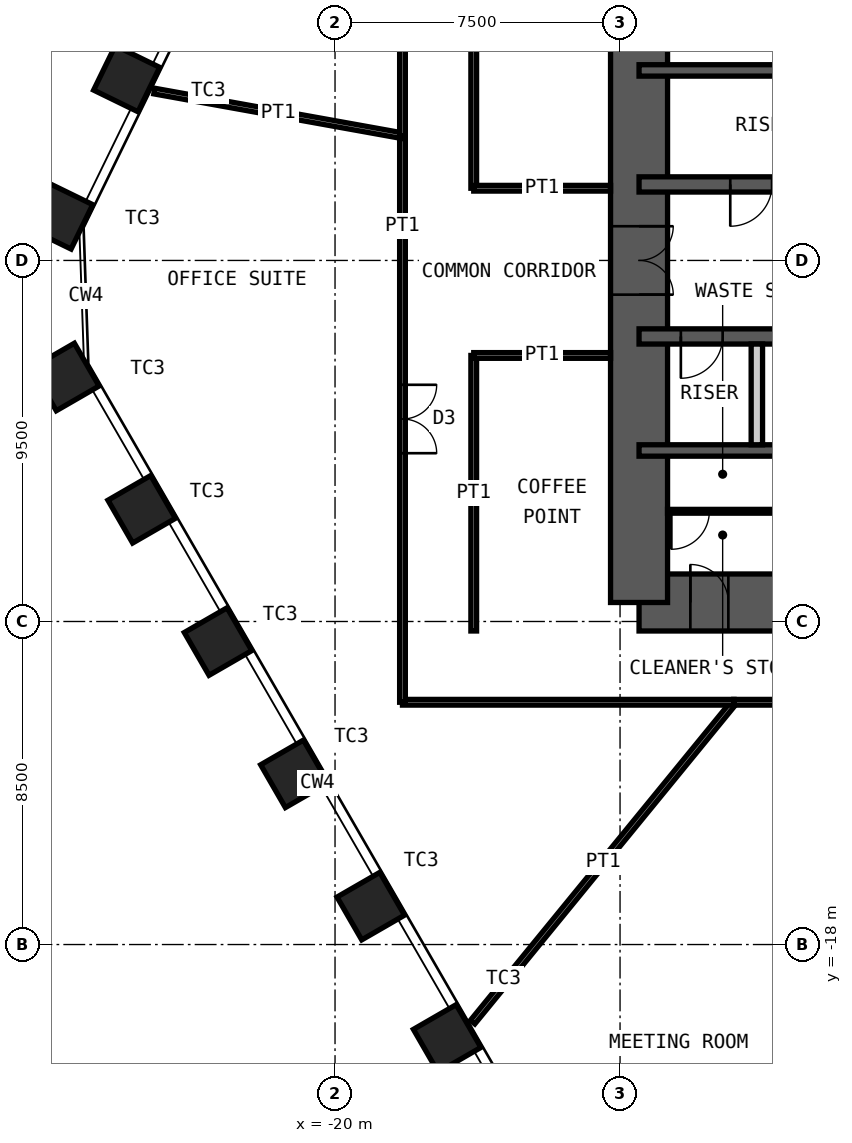
"""IFC4 building model, lengths in metres.
Left out: names, types, materials, properties, quantities, classifications, styles, units other than length and angle.
Written with IfcOpenShell. Run it as: python <this file> out.ifc"""

import sys

from ifc_helpers import new_model, si_unit, direction, frame, frame_2d, origin, origin_2d, place, context, subcontext, project, spatial, rectangle, hollow_rectangle, extrude, element, fill, save


model = new_model("IFC4")
c1 = context("Model", 3, precision=1e-05, world=origin(), true_north=direction((0.0, 1.0)))
c2 = subcontext(c1, "Body", "Model", "MODEL_VIEW")
j1 = project(units=[si_unit("LENGTHUNIT", "METRE"), si_unit("PLANEANGLEUNIT", "RADIAN")], contexts=[c1])
p1 = place(None, origin())
s1 = spatial("IfcSite", under=j1, at=p1, CompositionType="ELEMENT")
p2 = place(p1, origin())
s2 = spatial("IfcBuilding", under=s1, at=p2, CompositionType="ELEMENT")
p3 = place(p2, frame((0.0, 0.0, 107.2)))
s3 = spatial("IfcBuildingStorey", under=s2, at=p3, CompositionType="ELEMENT", Elevation=107.2)
for number, where, z_axis, x_axis in (
    (1, (-17.049, -20.47, 0.0), (0.0, 0.0, 1.0), (0.5, -0.866, 0.0)),
    (2, (-19.059, -16.989, 0.0), (0.0, 0.0, 1.0), (0.5, -0.866, 0.0)),
    (3, (-21.068, -13.509, 0.0), (0.0, 0.0, 1.0), (0.5, -0.866, 0.0)),
    (4, (-23.078, -10.028, 0.0), (0.0, 0.0, 1.0), (0.5, -0.866, 0.0)),
    (5, (-25.087, -6.547, 0.0), (0.0, 0.0, 1.0), (0.5, -0.866, 0.0)),
    (6, (-27.097, -3.067, 0.0), (0.0, 0.0, 1.0), (0.5, -0.866, 0.0)),
    (7, (-27.245, 1.169, 0.0), (0.0, 0.0, 1.0), (-0.438, -0.899, 0.0)),
    (8, (-25.483, 4.781, 0.0), (0.0, 0.0, 1.0), (-0.438, -0.899, 0.0)),
):
    element("IfcColumn", number, at=place(p3, frame(where, z_axis=z_axis, x_axis=x_axis)), inside=s3, PredefinedType="COLUMN", context=c2, shape_type="SweptSolid", body=[
        extrude(hollow_rectangle(XDim=1.3, YDim=1.3, WallThickness=0.1, at=origin_2d()), origin(), (0.0, 0.0, 1.0), 4.2),
    ])
p4 = place(p3, frame((-12.0, -9.0, 0.0), z_axis=(0.0, 0.0, 1.0), x_axis=(1.0, 0.0, 0.0)))
e9 = element("IfcWall", 9, at=p4, inside=s3, PredefinedType="SHEAR", context=c2, shape_type="SweptSolid", body=[
    extrude(rectangle(XDim=24.0, YDim=1.5, at=frame_2d((12.0, 0.0))), origin(), (0.0, 0.0, 1.0), 4.2),
])
p5 = place(p4, frame((1.35, 0.0, 0.0)))
e10 = element("IfcOpeningElement", 10, at=p5, cuts=e9, PredefinedType="OPENING", context=c2, shape_type="SweptSolid", body=[
    extrude(rectangle(XDim=1.0, YDim=2.1, at=frame_2d((0.5, 1.05))), frame((0.0, 0.76, 0.0), z_axis=(0.0, -1.0, 0.0), x_axis=(1.0, 0.0, 0.0)), (0.0, 0.0, 1.0), 1.52),
])
p6 = place(p4, frame((5.325, 0.0, 0.0)))
e11 = element("IfcOpeningElement", 11, at=p6, cuts=e9, PredefinedType="OPENING", context=c2, shape_type="SweptSolid", body=[
    extrude(rectangle(XDim=1.15, YDim=2.1, at=frame_2d((0.575, 1.05))), frame((0.0, 0.76, 0.0), z_axis=(0.0, -1.0, 0.0), x_axis=(1.0, 0.0, 0.0)), (0.0, 0.0, 1.0), 1.52),
])
p7 = place(p4, frame((12.6, 0.0, 0.0)))
e12 = element("IfcOpeningElement", 12, at=p7, cuts=e9, PredefinedType="OPENING", context=c2, shape_type="SweptSolid", body=[
    extrude(rectangle(XDim=1.0, YDim=2.1, at=frame_2d((0.5, 1.05))), frame((0.0, 0.76, 0.0), z_axis=(0.0, -1.0, 0.0), x_axis=(1.0, 0.0, 0.0)), (0.0, 0.0, 1.0), 1.52),
])
p8 = place(p3, frame((-12.0, -9.0, 0.0), z_axis=(0.0, 0.0, 1.0), x_axis=(0.0, 1.0, 0.0)))
e13 = element("IfcWall", 13, at=p8, inside=s3, PredefinedType="SHEAR", context=c2, shape_type="SweptSolid", body=[
    extrude(rectangle(XDim=18.0, YDim=1.5, at=frame_2d((9.0, 0.0))), origin(), (0.0, 0.0, 1.0), 4.2),
])
p9 = place(p8, frame((8.1, 0.0, 0.0)))
e14 = element("IfcOpeningElement", 14, at=p9, cuts=e13, PredefinedType="OPENING", context=c2, shape_type="SweptSolid", body=[
    extrude(rectangle(XDim=1.8, YDim=2.1, at=frame_2d((0.9, 1.05))), frame((0.0, 0.76, 0.0), z_axis=(0.0, -1.0, 0.0), x_axis=(1.0, 0.0, 0.0)), (0.0, 0.0, 1.0), 1.52),
])
p10 = place(p3, frame((-12.0, 5.0, 0.0), z_axis=(0.0, 0.0, 1.0), x_axis=(1.0, 0.0, 0.0)))
e15 = element("IfcWall", 15, at=p10, inside=s3, PredefinedType="SHEAR", context=c2, shape_type="SweptSolid", body=[
    extrude(rectangle(XDim=24.0, YDim=0.3, at=frame_2d((12.0, 0.0))), origin(), (0.0, 0.0, 1.0), 4.2),
])
p11 = place(p3, frame((-12.0, 2.0, 0.0), z_axis=(0.0, 0.0, 1.0), x_axis=(1.0, 0.0, 0.0)))
e16 = element("IfcWall", 16, at=p11, inside=s3, PredefinedType="SHEAR", context=c2, shape_type="SweptSolid", body=[
    extrude(rectangle(XDim=24.0, YDim=0.4, at=frame_2d((12.0, 0.0))), origin(), (0.0, 0.0, 1.0), 4.2),
])
p12 = place(p11, frame((2.4, 0.0, 0.0)))
e17 = element("IfcOpeningElement", 17, at=p12, cuts=e16, PredefinedType="OPENING", context=c2, shape_type="SweptSolid", body=[
    extrude(rectangle(XDim=1.1, YDim=2.1, at=frame_2d((0.55, 1.05))), frame((0.0, 0.21, 0.0), z_axis=(0.0, -1.0, 0.0), x_axis=(1.0, 0.0, 0.0)), (0.0, 0.0, 1.0), 0.42),
])
p13 = place(p11, frame((22.0, 0.0, 0.0)))
e18 = element("IfcOpeningElement", 18, at=p13, cuts=e16, PredefinedType="OPENING", context=c2, shape_type="SweptSolid", body=[
    extrude(rectangle(XDim=1.1, YDim=2.1, at=frame_2d((0.55, 1.05))), frame((0.0, 0.21, 0.0), z_axis=(0.0, -1.0, 0.0), x_axis=(1.0, 0.0, 0.0)), (0.0, 0.0, 1.0), 0.42),
])
p14 = place(p11, frame((10.15, 0.0, 0.0)))
e19 = element("IfcOpeningElement", 19, at=p14, cuts=e16, PredefinedType="OPENING", context=c2, shape_type="SweptSolid", body=[
    extrude(rectangle(XDim=1.0, YDim=2.1, at=frame_2d((0.5, 1.05))), frame((0.0, 0.21, 0.0), z_axis=(0.0, -1.0, 0.0), x_axis=(1.0, 0.0, 0.0)), (0.0, 0.0, 1.0), 0.42),
])
p15 = place(p11, frame((6.9, 0.0, 0.0)))
e20 = element("IfcOpeningElement", 20, at=p15, cuts=e16, PredefinedType="OPENING", context=c2, shape_type="SweptSolid", body=[
    extrude(rectangle(XDim=1.0, YDim=2.1, at=frame_2d((0.5, 1.05))), frame((0.0, 0.21, 0.0), z_axis=(0.0, -1.0, 0.0), x_axis=(1.0, 0.0, 0.0)), (0.0, 0.0, 1.0), 0.42),
])
p16 = place(p11, frame((13.35, 0.0, 0.0)))
e21 = element("IfcOpeningElement", 21, at=p16, cuts=e16, PredefinedType="OPENING", context=c2, shape_type="SweptSolid", body=[
    extrude(rectangle(XDim=1.1, YDim=2.4, at=frame_2d((0.55, 1.2))), frame((0.0, 0.21, 0.0), z_axis=(0.0, -1.0, 0.0), x_axis=(1.0, 0.0, 0.0)), (0.0, 0.0, 1.0), 0.42),
])
p17 = place(p11, frame((16.15, 0.0, 0.0)))
e22 = element("IfcOpeningElement", 22, at=p17, cuts=e16, PredefinedType="OPENING", context=c2, shape_type="SweptSolid", body=[
    extrude(rectangle(XDim=1.1, YDim=2.4, at=frame_2d((0.55, 1.2))), frame((0.0, 0.21, 0.0), z_axis=(0.0, -1.0, 0.0), x_axis=(1.0, 0.0, 0.0)), (0.0, 0.0, 1.0), 0.42),
])
p18 = place(p11, frame((18.95, 0.0, 0.0)))
e23 = element("IfcOpeningElement", 23, at=p18, cuts=e16, PredefinedType="OPENING", context=c2, shape_type="SweptSolid", body=[
    extrude(rectangle(XDim=1.1, YDim=2.4, at=frame_2d((0.55, 1.2))), frame((0.0, 0.21, 0.0), z_axis=(0.0, -1.0, 0.0), x_axis=(1.0, 0.0, 0.0)), (0.0, 0.0, 1.0), 0.42),
])
p19 = place(p3, frame((-12.0, -2.0, 0.0), z_axis=(0.0, 0.0, 1.0), x_axis=(1.0, 0.0, 0.0)))
e24 = element("IfcWall", 24, at=p19, inside=s3, PredefinedType="SHEAR", context=c2, shape_type="SweptSolid", body=[
    extrude(rectangle(XDim=24.0, YDim=0.4, at=frame_2d((12.0, 0.0))), origin(), (0.0, 0.0, 1.0), 4.2),
])
p20 = place(p19, frame((1.1, 0.0, 0.0)))
e25 = element("IfcOpeningElement", 25, at=p20, cuts=e24, PredefinedType="OPENING", context=c2, shape_type="SweptSolid", body=[
    extrude(rectangle(XDim=1.1, YDim=2.1, at=frame_2d((0.55, 1.05))), frame((0.0, 0.21, 0.0), z_axis=(0.0, -1.0, 0.0), x_axis=(1.0, 0.0, 0.0)), (0.0, 0.0, 1.0), 0.42),
])
p21 = place(p19, frame((13.55, 0.0, 0.0)))
e26 = element("IfcOpeningElement", 26, at=p21, cuts=e24, PredefinedType="OPENING", context=c2, shape_type="SweptSolid", body=[
    extrude(rectangle(XDim=1.1, YDim=2.1, at=frame_2d((0.55, 1.05))), frame((0.0, 0.21, 0.0), z_axis=(0.0, -1.0, 0.0), x_axis=(1.0, 0.0, 0.0)), (0.0, 0.0, 1.0), 0.42),
])
p22 = place(p19, frame((20.7, 0.0, 0.0)))
e27 = element("IfcOpeningElement", 27, at=p22, cuts=e24, PredefinedType="OPENING", context=c2, shape_type="SweptSolid", body=[
    extrude(rectangle(XDim=1.1, YDim=2.1, at=frame_2d((0.55, 1.05))), frame((0.0, 0.21, 0.0), z_axis=(0.0, -1.0, 0.0), x_axis=(1.0, 0.0, 0.0)), (0.0, 0.0, 1.0), 0.42),
])
p23 = place(p3, frame((-12.0, -5.0, 0.0), z_axis=(0.0, 0.0, 1.0), x_axis=(1.0, 0.0, 0.0)))
e28 = element("IfcWall", 28, at=p23, inside=s3, PredefinedType="SHEAR", context=c2, shape_type="SweptSolid", body=[
    extrude(rectangle(XDim=24.0, YDim=0.3, at=frame_2d((12.0, 0.0))), origin(), (0.0, 0.0, 1.0), 4.2),
])
p24 = place(p3, frame((-8.9, -4.85, 0.0), z_axis=(0.0, 0.0, 1.0), x_axis=(0.0, 1.0, 0.0)))
e29 = element("IfcWall", 29, at=p24, inside=s3, PredefinedType="PARTITIONING", context=c2, shape_type="SweptSolid", body=[
    extrude(rectangle(XDim=2.65, YDim=0.3, at=frame_2d((1.325, 0.0))), origin(), (0.0, 0.0, 1.0), 3.98),
])
p25 = place(p3, frame((-11.25, -6.6, 0.0), z_axis=(0.0, 0.0, 1.0), x_axis=(1.0, 0.0, 0.0)))
e30 = element("IfcWall", 30, at=p25, inside=s3, PredefinedType="PARTITIONING", context=c2, shape_type="SweptSolid", body=[
    extrude(rectangle(XDim=2.9, YDim=0.1, at=frame_2d((1.45, 0.0))), origin(), (0.0, 0.0, 1.0), 3.98),
])
p26 = place(p25, frame((0.1, 0.0, 0.0)))
e31 = element("IfcOpeningElement", 31, at=p26, cuts=e30, PredefinedType="OPENING", context=c2, shape_type="SweptSolid", body=[
    extrude(rectangle(XDim=1.0, YDim=2.4, at=frame_2d((0.5, 1.2))), frame((0.0, 0.06, 0.0), z_axis=(0.0, -1.0, 0.0), x_axis=(1.0, 0.0, 0.0)), (0.0, 0.0, 1.0), 0.12),
])
p27 = place(p3, frame((-16.38, -20.042, 0.0), z_axis=(0.0, 0.0, 1.0), x_axis=(0.632814540967, 0.774303400962, 0.0)))
e32 = element("IfcWall", 32, at=p27, inside=s3, PredefinedType="PARTITIONING", context=c2, shape_type="SweptSolid", body=[
    extrude(rectangle(XDim=10.871, YDim=0.15, at=frame_2d((5.435, 0.0))), origin(), (0.0, 0.0, 1.0), 3.33),
])
p28 = place(p3, frame((-9.501, -11.625, 0.0), z_axis=(0.0, 0.0, 1.0), x_axis=(-1.0, 0.0, 0.0)))
e33 = element("IfcWall", 33, at=p28, inside=s3, PredefinedType="PARTITIONING", context=c2, shape_type="SweptSolid", body=[
    extrude(rectangle(XDim=8.724, YDim=0.15, at=frame_2d((4.362, 0.0))), origin(), (0.0, 0.0, 1.0), 4.03),
])
p29 = place(p3, frame((-18.225, -11.625, 0.0), z_axis=(0.0, 0.0, 1.0), x_axis=(0.0, 1.0, 0.0)))
e34 = element("IfcWall", 34, at=p29, inside=s3, PredefinedType="PARTITIONING", context=c2, shape_type="SweptSolid", body=[
    extrude(rectangle(XDim=14.906, YDim=0.15, at=frame_2d((7.453, 0.0))), origin(), (0.0, 0.0, 1.0), 4.03),
])
p30 = place(p29, frame((6.553, 0.0, 0.0)))
e35 = element("IfcOpeningElement", 35, at=p30, cuts=e34, PredefinedType="OPENING", context=c2, shape_type="SweptSolid", body=[
    extrude(rectangle(XDim=1.8, YDim=2.4, at=frame_2d((0.9, 1.2))), frame((0.0, 0.085, 0.0), z_axis=(0.0, -1.0, 0.0), x_axis=(1.0, 0.0, 0.0)), (0.0, 0.0, 1.0), 0.17),
])
p31 = place(p3, frame((-24.755, 4.457, 0.0), z_axis=(0.0, 0.0, 1.0), x_axis=(0.984174598206, -0.177201467959, 0.0)))
e36 = element("IfcWall", 36, at=p31, inside=s3, PredefinedType="PARTITIONING", context=c2, shape_type="SweptSolid", body=[
    extrude(rectangle(XDim=6.635, YDim=0.15, at=frame_2d((3.318, 0.0))), origin(), (0.0, 0.0, 1.0), 3.33),
])
p32 = place(p3, frame((-18.225, 3.281, 0.0), z_axis=(0.0, 0.0, 1.0), x_axis=(0.0, 1.0, 0.0)))
e37 = element("IfcWall", 37, at=p32, inside=s3, PredefinedType="PARTITIONING", context=c2, shape_type="SweptSolid", body=[
    extrude(rectangle(XDim=8.344, YDim=0.15, at=frame_2d((4.172, 0.0))), origin(), (0.0, 0.0, 1.0), 4.03),
])
p33 = place(p3, frame((-3.497, -11.625, 0.0), z_axis=(0.0, 0.0, 1.0), x_axis=(-1.0, 0.0, 0.0)))
e38 = element("IfcWall", 38, at=p33, inside=s3, PredefinedType="PARTITIONING", context=c2, shape_type="SweptSolid", body=[
    extrude(rectangle(XDim=6.004, YDim=0.15, at=frame_2d((3.002, 0.0))), origin(), (0.0, 0.0, 1.0), 4.03),
])
p34 = place(p33, frame((2.502, 0.0, 0.0)))
e39 = element("IfcOpeningElement", 39, at=p34, cuts=e38, PredefinedType="OPENING", context=c2, shape_type="SweptSolid", body=[
    extrude(rectangle(XDim=1.0, YDim=2.4, at=frame_2d((0.5, 1.2))), frame((0.0, 0.085, 0.0), z_axis=(0.0, -1.0, 0.0), x_axis=(1.0, 0.0, 0.0)), (0.0, 0.0, 1.0), 0.17),
])
p35 = place(p3, frame((-16.35, 1.9, 0.0), z_axis=(0.0, 0.0, 1.0), x_axis=(0.0, 1.0, 0.0)))
e40 = element("IfcWall", 40, at=p35, inside=s3, PredefinedType="PARTITIONING", context=c2, shape_type="SweptSolid", body=[
    extrude(rectangle(XDim=7.85, YDim=0.15, at=frame_2d((3.925, 0.0))), origin(), (0.0, 0.0, 1.0), 4.03),
])
p36 = place(p3, frame((-12.75, 1.9, 0.0), z_axis=(0.0, 0.0, 1.0), x_axis=(-1.0, 0.0, 0.0)))
e41 = element("IfcWall", 41, at=p36, inside=s3, PredefinedType="PARTITIONING", context=c2, shape_type="SweptSolid", body=[
    extrude(rectangle(XDim=3.6, YDim=0.15, at=frame_2d((1.8, 0.0))), origin(), (0.0, 0.0, 1.0), 3.33),
])
p37 = place(p3, frame((-16.35, -9.75, 0.0), z_axis=(0.0, 0.0, 1.0), x_axis=(0.0, 1.0, 0.0)))
e42 = element("IfcWall", 42, at=p37, inside=s3, PredefinedType="PARTITIONING", context=c2, shape_type="SweptSolid", body=[
    extrude(rectangle(XDim=7.25, YDim=0.15, at=frame_2d((3.625, 0.0))), origin(), (0.0, 0.0, 1.0), 4.03),
])
p38 = place(p3, frame((-12.75, -2.5, 0.0), z_axis=(0.0, 0.0, 1.0), x_axis=(-1.0, 0.0, 0.0)))
e43 = element("IfcWall", 43, at=p38, inside=s3, PredefinedType="PARTITIONING", context=c2, shape_type="SweptSolid", body=[
    extrude(rectangle(XDim=3.6, YDim=0.15, at=frame_2d((1.8, 0.0))), origin(), (0.0, 0.0, 1.0), 3.33),
])
p39 = place(p5, origin())
e44 = element("IfcDoor", 44, at=p39, inside=s3, OperationType="SINGLE_SWING_RIGHT", PredefinedType="DOOR", context=c2, shape_type="SweptSolid", body=[
    extrude(rectangle(XDim=1.0, YDim=2.1, at=frame_2d((0.5, 1.05))), frame((0.0, 0.025, 0.0), z_axis=(0.0, -1.0, 0.0), x_axis=(1.0, 0.0, 0.0)), (0.0, 0.0, 1.0), 0.05),
])
fill(e10, e44)
p40 = place(p12, origin())
e45 = element("IfcDoor", 45, at=p40, inside=s3, OperationType="SINGLE_SWING_LEFT", PredefinedType="DOOR", context=c2, shape_type="SweptSolid", body=[
    extrude(rectangle(XDim=1.1, YDim=2.1, at=frame_2d((0.55, 1.05))), frame((0.0, 0.025, 0.0), z_axis=(0.0, -1.0, 0.0), x_axis=(1.0, 0.0, 0.0)), (0.0, 0.0, 1.0), 0.05),
])
fill(e17, e45)
p41 = place(p20, origin())
e46 = element("IfcDoor", 46, at=p41, inside=s3, OperationType="SINGLE_SWING_LEFT", PredefinedType="DOOR", context=c2, shape_type="SweptSolid", body=[
    extrude(rectangle(XDim=1.1, YDim=2.1, at=frame_2d((0.55, 1.05))), frame((0.0, 0.025, 0.0), z_axis=(0.0, -1.0, 0.0), x_axis=(1.0, 0.0, 0.0)), (0.0, 0.0, 1.0), 0.05),
])
fill(e25, e46)
p42 = place(p9, origin())
e47 = element("IfcDoor", 47, at=p42, inside=s3, OperationType="DOUBLE_DOOR_DOUBLE_SWING", PredefinedType="DOOR", context=c2, shape_type="SweptSolid", body=[
    extrude(rectangle(XDim=1.8, YDim=2.1, at=frame_2d((0.9, 1.05))), frame((0.0, 0.025, 0.0), z_axis=(0.0, -1.0, 0.0), x_axis=(1.0, 0.0, 0.0)), (0.0, 0.0, 1.0), 0.05),
])
fill(e14, e47)
p43 = place(p26, origin())
e48 = element("IfcDoor", 48, at=p43, inside=s3, OperationType="SINGLE_SWING_LEFT", PredefinedType="DOOR", context=c2, shape_type="SweptSolid", body=[
    extrude(rectangle(XDim=1.0, YDim=2.4, at=frame_2d((0.5, 1.2))), frame((0.0, 0.025, 0.0), z_axis=(0.0, -1.0, 0.0), x_axis=(1.0, 0.0, 0.0)), (0.0, 0.0, 1.0), 0.05),
])
fill(e31, e48)
p44 = place(p30, origin())
e49 = element("IfcDoor", 49, at=p44, inside=s3, OperationType="DOUBLE_DOOR_DOUBLE_SWING", PredefinedType="DOOR", context=c2, shape_type="SweptSolid", body=[
    extrude(rectangle(XDim=1.8, YDim=2.4, at=frame_2d((0.9, 1.2))), frame((0.0, 0.025, 0.0), z_axis=(0.0, -1.0, 0.0), x_axis=(1.0, 0.0, 0.0)), (0.0, 0.0, 1.0), 0.05),
])
fill(e35, e49)
save(model, sys.argv[1])
